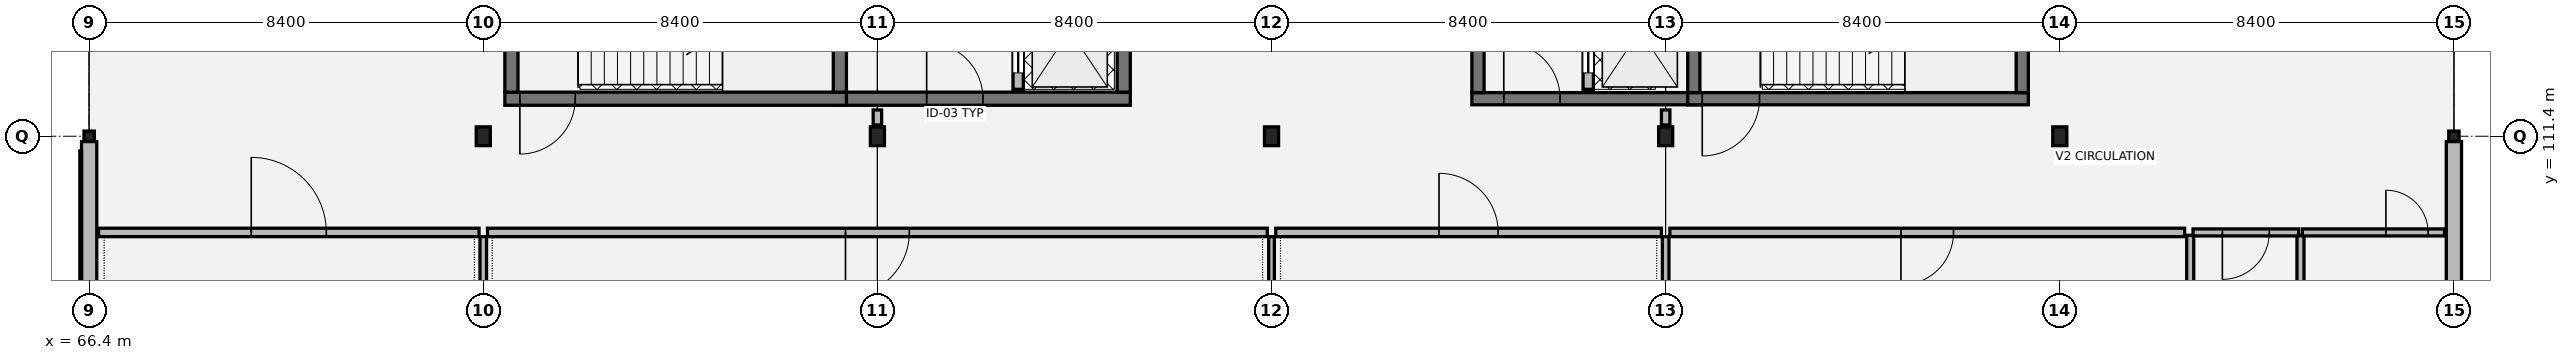
"""IFC4 building model, lengths in metres.
Left out: names, types, materials, properties, quantities, classifications, styles, units other than length and angle.
Written with IfcOpenShell. Run it as: python <this file> out.ifc"""

import sys

from ifc_helpers import new_model, si_unit, direction, frame, frame_2d, origin, origin_2d, place, context, subcontext, project, spatial, rectangle, hollow_rectangle, i_section, extrude, element, fill, save


model = new_model("IFC4")
c1 = context("Model", 3, precision=1e-05, world=origin(), true_north=direction((0.0, 1.0)))
c2 = subcontext(c1, "Body", "Model", "MODEL_VIEW")
j1 = project(units=[si_unit("LENGTHUNIT", "METRE"), si_unit("PLANEANGLEUNIT", "RADIAN")], contexts=[c1])
p1 = place(None, origin())
s1 = spatial("IfcSite", under=j1, at=p1, CompositionType="ELEMENT")
p2 = place(p1, origin())
s2 = spatial("IfcBuilding", under=s1, at=p2, CompositionType="ELEMENT")
p3 = place(p2, frame((0.0, 0.0, 13.26)))
s3 = spatial("IfcBuildingStorey", under=s2, at=p3, CompositionType="ELEMENT", Elevation=13.26)
p4 = place(p3, frame((66.4, 111.4, 0.0), z_axis=(0.0, 0.0, 1.0), x_axis=(1.0, 0.0, 0.0)))
e1 = element("IfcColumn", 1, at=p4, inside=s3, PredefinedType="COLUMN", context=c2, shape_type="SweptSolid", body=[
    extrude(hollow_rectangle(XDim=0.22, YDim=0.22, WallThickness=0.01, at=origin_2d()), origin(), (0.0, 0.0, 1.0), 4.055),
])
for number, where, z_axis, x_axis in (
    (2, (74.8, 111.4, 0.0), (0.0, 0.0, 1.0), (1.0, 0.0, 0.0)),
    (3, (83.2, 111.4, 0.0), (0.0, 0.0, 1.0), (1.0, 0.0, 0.0)),
    (4, (91.6, 111.4, 0.0), (0.0, 0.0, 1.0), (1.0, 0.0, 0.0)),
    (5, (100.0, 111.4, 0.0), (0.0, 0.0, 1.0), (1.0, 0.0, 0.0)),
    (6, (108.4, 111.4, 0.0), (0.0, 0.0, 1.0), (1.0, 0.0, 0.0)),
):
    element("IfcColumn", number, at=place(p3, frame(where, z_axis=z_axis, x_axis=x_axis)), inside=s3, PredefinedType="COLUMN", context=c2, shape_type="SweptSolid", body=[
        extrude(i_section(OverallWidth=0.3, OverallDepth=0.4, WebThickness=0.013, FlangeThickness=0.024, at=origin_2d()), origin(), (0.0, 0.0, 1.0), 4.055),
    ])
p5 = place(p3, frame((116.8, 111.4, 0.0), z_axis=(0.0, 0.0, 1.0), x_axis=(1.0, 0.0, 0.0)))
e7 = element("IfcColumn", 7, at=p5, inside=s3, PredefinedType="COLUMN", context=c2, shape_type="SweptSolid", body=[
    extrude(hollow_rectangle(XDim=0.22, YDim=0.22, WallThickness=0.01, at=origin_2d()), origin(), (0.0, 0.0, 1.0), 4.055),
])
for number, where, z_axis, x_axis in (
    (8, (116.8, 103.913, 0.0), (0.0, 0.0, 1.0), (0.0, 1.0, 0.0)),
    (9, (66.4, 111.287, 0.0), (0.0, 0.0, 1.0), (0.0, -1.0, 0.0)),
):
    element("IfcWall", number, at=place(p3, frame(where, z_axis=z_axis, x_axis=x_axis)), inside=s3, PredefinedType="SOLIDWALL", context=c2, shape_type="SweptSolid", body=[
        extrude(rectangle(XDim=7.374, YDim=0.325, at=frame_2d((3.687, 0.0))), origin(), (0.0, 0.0, 1.0), 3.48),
    ])
p6 = place(p3, frame((82.26, 112.2, 0.0), z_axis=(0.0, 0.0, 1.0), x_axis=(1.0, 0.0, 0.0)))
e10 = element("IfcWall", 10, at=p6, inside=s3, PredefinedType="SHEAR", context=c2, shape_type="SweptSolid", body=[
    extrude(rectangle(XDim=6.33, YDim=0.28, at=frame_2d((3.165, 0.0))), origin(), (0.0, 0.0, 1.0), 3.845),
])
p7 = place(p6, frame((1.99, 0.0, 0.0)))
e11 = element("IfcOpeningElement", 11, at=p7, cuts=e10, PredefinedType="OPENING", context=c2, shape_type="SweptSolid", body=[
    extrude(rectangle(XDim=1.2, YDim=2.16, at=frame_2d((0.6, 1.08))), frame((0.0, 0.15, 0.0), z_axis=(0.0, -1.0, 0.0), x_axis=(1.0, 0.0, 0.0)), (0.0, 0.0, 1.0), 0.3),
])
p8 = place(p3, frame((88.45, 112.34, 0.0), z_axis=(0.0, 0.0, 1.0), x_axis=(0.0, 1.0, 0.0)))
e12 = element("IfcWall", 12, at=p8, inside=s3, PredefinedType="SHEAR", context=c2, shape_type="SweptSolid", body=[
    extrude(rectangle(XDim=5.72, YDim=0.28, at=frame_2d((2.86, 0.0))), origin(), (0.0, 0.0, 1.0), 3.845),
])
p9 = place(p3, frame((86.2, 112.4, 0.0), z_axis=(0.0, 0.0, 1.0), x_axis=(0.0, 1.0, 0.0)))
e13 = element("IfcWall", 13, at=p9, inside=s3, PredefinedType="SOLIDWALL", context=c2, shape_type="SweptSolid", body=[
    extrude(rectangle(XDim=5.6, YDim=0.22, at=frame_2d((2.8, 0.0))), origin(), (0.0, 0.0, 1.0), 3.845),
])
p10 = place(p9, frame((0.35, 0.0, 0.0)))
e14 = element("IfcOpeningElement", 14, at=p10, cuts=e13, PredefinedType="OPENING", context=c2, shape_type="SweptSolid", body=[
    extrude(rectangle(XDim=1.1, YDim=2.15, at=frame_2d((0.55, 1.075))), frame((0.0, 0.12, 0.0), z_axis=(0.0, -1.0, 0.0), x_axis=(1.0, 0.0, 0.0)), (0.0, 0.0, 1.0), 0.24),
])
p11 = place(p9, frame((2.4, 0.0, 0.0)))
e15 = element("IfcOpeningElement", 15, at=p11, cuts=e13, PredefinedType="OPENING", context=c2, shape_type="SweptSolid", body=[
    extrude(rectangle(XDim=1.1, YDim=2.15, at=frame_2d((0.55, 1.075))), frame((0.0, 0.12, 0.0), z_axis=(0.0, -1.0, 0.0), x_axis=(1.0, 0.0, 0.0)), (0.0, 0.0, 1.0), 0.24),
])
p12 = place(p3, frame((75.26, 112.2, 0.0), z_axis=(0.0, 0.0, 1.0), x_axis=(1.0, 0.0, 0.0)))
e16 = element("IfcWall", 16, at=p12, inside=s3, PredefinedType="SHEAR", context=c2, shape_type="SweptSolid", body=[
    extrude(rectangle(XDim=7.28, YDim=0.28, at=frame_2d((3.64, 0.0))), origin(), (0.0, 0.0, 1.0), 3.845),
])
p13 = place(p12, frame((0.32, 0.0, 0.0)))
e17 = element("IfcOpeningElement", 17, at=p13, cuts=e16, PredefinedType="OPENING", context=c2, shape_type="SweptSolid", body=[
    extrude(rectangle(XDim=1.18, YDim=2.18, at=frame_2d((0.59, 1.09))), frame((0.0, 0.15, 0.0), z_axis=(0.0, -1.0, 0.0), x_axis=(1.0, 0.0, 0.0)), (0.0, 0.0, 1.0), 0.3),
])
for number, where, z_axis, x_axis in (
    (18, (75.4, 112.34, 0.0), (0.0, 0.0, 1.0), (0.0, 1.0, 0.0)),
    (19, (82.4, 112.34, 0.0), (0.0, 0.0, 1.0), (0.0, 1.0, 0.0)),
):
    element("IfcWall", number, at=place(p3, frame(where, z_axis=z_axis, x_axis=x_axis)), inside=s3, PredefinedType="SHEAR", context=c2, shape_type="SweptSolid", body=[
        extrude(rectangle(XDim=5.72, YDim=0.28, at=frame_2d((2.86, 0.0))), origin(), (0.0, 0.0, 1.0), 3.845),
    ])
p14 = place(p3, frame((95.87, 112.2, 0.0), z_axis=(0.0, 0.0, 1.0), x_axis=(1.0, 0.0, 0.0)))
e20 = element("IfcWall", 20, at=p14, inside=s3, PredefinedType="SHEAR", context=c2, shape_type="SweptSolid", body=[
    extrude(rectangle(XDim=4.86, YDim=0.26, at=frame_2d((2.43, 0.0))), origin(), (0.0, 0.0, 1.0), 3.845),
])
p15 = place(p14, frame((0.68, 0.0, 0.0)))
e21 = element("IfcOpeningElement", 21, at=p15, cuts=e20, PredefinedType="OPENING", context=c2, shape_type="SweptSolid", body=[
    extrude(rectangle(XDim=1.2, YDim=2.16, at=frame_2d((0.6, 1.08))), frame((0.0, 0.14, 0.0), z_axis=(0.0, -1.0, 0.0), x_axis=(1.0, 0.0, 0.0)), (0.0, 0.0, 1.0), 0.28),
])
p16 = place(p3, frame((96.0, 118.07, 0.0), z_axis=(0.0, 0.0, 1.0), x_axis=(0.0, -1.0, 0.0)))
e22 = element("IfcWall", 22, at=p16, inside=s3, PredefinedType="SHEAR", context=c2, shape_type="SweptSolid", body=[
    extrude(rectangle(XDim=5.74, YDim=0.26, at=frame_2d((2.87, 0.0))), origin(), (0.0, 0.0, 1.0), 3.845),
])
p17 = place(p3, frame((98.35, 112.4, 0.0), z_axis=(0.0, 0.0, 1.0), x_axis=(0.0, 1.0, 0.0)))
e23 = element("IfcWall", 23, at=p17, inside=s3, PredefinedType="SOLIDWALL", context=c2, shape_type="SweptSolid", body=[
    extrude(rectangle(XDim=5.6, YDim=0.22, at=frame_2d((2.8, 0.0))), origin(), (0.0, 0.0, 1.0), 3.845),
])
p18 = place(p17, frame((0.35, 0.0, 0.0)))
e24 = element("IfcOpeningElement", 24, at=p18, cuts=e23, PredefinedType="OPENING", context=c2, shape_type="SweptSolid", body=[
    extrude(rectangle(XDim=1.1, YDim=2.15, at=frame_2d((0.55, 1.075))), frame((0.0, 0.12, 0.0), z_axis=(0.0, -1.0, 0.0), x_axis=(1.0, 0.0, 0.0)), (0.0, 0.0, 1.0), 0.24),
])
p19 = place(p3, frame((100.47, 112.2, 0.0), z_axis=(0.0, 0.0, 1.0), x_axis=(1.0, 0.0, 0.0)))
e25 = element("IfcWall", 25, at=p19, inside=s3, PredefinedType="SHEAR", context=c2, shape_type="SweptSolid", body=[
    extrude(rectangle(XDim=7.26, YDim=0.26, at=frame_2d((3.63, 0.0))), origin(), (0.0, 0.0, 1.0), 3.845),
])
p20 = place(p19, frame((0.31, 0.0, 0.0)))
e26 = element("IfcOpeningElement", 26, at=p20, cuts=e25, PredefinedType="OPENING", context=c2, shape_type="SweptSolid", body=[
    extrude(rectangle(XDim=1.22, YDim=2.18, at=frame_2d((0.61, 1.09))), frame((0.0, 0.14, 0.0), z_axis=(0.0, -1.0, 0.0), x_axis=(1.0, 0.0, 0.0)), (0.0, 0.0, 1.0), 0.28),
])
for number, where, z_axis, x_axis in (
    (27, (100.6, 112.33, 0.0), (0.0, 0.0, 1.0), (0.0, 1.0, 0.0)),
    (28, (107.6, 112.33, 0.0), (0.0, 0.0, 1.0), (0.0, 1.0, 0.0)),
):
    element("IfcWall", number, at=place(p3, frame(where, z_axis=z_axis, x_axis=x_axis)), inside=s3, PredefinedType="SHEAR", context=c2, shape_type="SweptSolid", body=[
        extrude(rectangle(XDim=5.74, YDim=0.26, at=frame_2d((2.87, 0.0))), origin(), (0.0, 0.0, 1.0), 3.845),
    ])
for number, where, z_axis, x_axis in (
    (29, (111.18, 106.93, 0.0), (0.0, 0.0, 1.0), (0.0, 1.0, 0.0)),
    (30, (113.53, 106.93, 0.0), (0.0, 0.0, 1.0), (0.0, 1.0, 0.0)),
):
    element("IfcWall", number, at=place(p3, frame(where, z_axis=z_axis, x_axis=x_axis)), inside=s3, PredefinedType="PARTITIONING", context=c2, shape_type="SweptSolid", body=[
        extrude(rectangle(XDim=2.36, YDim=0.15, at=frame_2d((1.18, 0.0))), origin(), (0.0, 0.0, 1.0), 3.18),
    ])
p21 = place(p3, frame((111.24, 109.35, 0.0), z_axis=(0.0, 0.0, 1.0), x_axis=(1.0, 0.0, 0.0)))
e31 = element("IfcWall", 31, at=p21, inside=s3, PredefinedType="PARTITIONING", context=c2, shape_type="SweptSolid", body=[
    extrude(rectangle(XDim=2.25, YDim=0.15, at=frame_2d((1.125, 0.0))), origin(), (0.0, 0.0, 1.0), 3.18),
])
p22 = place(p21, frame((0.625, 0.0, 0.0)))
e32 = element("IfcOpeningElement", 32, at=p22, cuts=e31, PredefinedType="OPENING", context=c2, shape_type="SweptSolid", body=[
    extrude(rectangle(XDim=1.0, YDim=2.15, at=frame_2d((0.5, 1.075))), frame((0.0, 0.085, 0.0), z_axis=(0.0, -1.0, 0.0), x_axis=(1.0, 0.0, 0.0)), (0.0, 0.0, 1.0), 0.17),
])
p23 = place(p3, frame((113.57, 109.35, 0.0), z_axis=(0.0, 0.0, 1.0), x_axis=(1.0, 0.0, 0.0)))
e33 = element("IfcWall", 33, at=p23, inside=s3, PredefinedType="PARTITIONING", context=c2, shape_type="SweptSolid", body=[
    extrude(rectangle(XDim=3.03, YDim=0.15, at=frame_2d((1.515, 0.0))), origin(), (0.0, 0.0, 1.0), 3.18),
])
p24 = place(p23, frame((1.78, 0.0, 0.0)))
e34 = element("IfcOpeningElement", 34, at=p24, cuts=e33, PredefinedType="OPENING", context=c2, shape_type="SweptSolid", body=[
    extrude(rectangle(XDim=0.9, YDim=2.15, at=frame_2d((0.45, 1.075))), frame((0.0, 0.085, 0.0), z_axis=(0.0, -1.0, 0.0), x_axis=(1.0, 0.0, 0.0)), (0.0, 0.0, 1.0), 0.17),
])
p25 = place(p3, frame((66.6, 109.35, 0.0), z_axis=(0.0, 0.0, 1.0), x_axis=(1.0, 0.0, 0.0)))
e35 = element("IfcWall", 35, at=p25, inside=s3, PredefinedType="PARTITIONING", context=c2, shape_type="SweptSolid", body=[
    extrude(rectangle(XDim=8.11, YDim=0.18, at=frame_2d((4.055, 0.0))), origin(), (0.0, 0.0, 1.0), 3.18),
])
p26 = place(p25, frame((3.255, 0.0, 0.0)))
e36 = element("IfcOpeningElement", 36, at=p26, cuts=e35, PredefinedType="OPENING", context=c2, shape_type="SweptSolid", body=[
    extrude(rectangle(XDim=1.6, YDim=2.25, at=frame_2d((0.8, 1.125))), frame((0.0, 0.1, 0.0), z_axis=(0.0, -1.0, 0.0), x_axis=(1.0, 0.0, 0.0)), (0.0, 0.0, 1.0), 0.2),
])
p27 = place(p3, frame((74.89, 109.35, 0.0), z_axis=(0.0, 0.0, 1.0), x_axis=(1.0, 0.0, 0.0)))
e37 = element("IfcWall", 37, at=p27, inside=s3, PredefinedType="PARTITIONING", context=c2, shape_type="SweptSolid", body=[
    extrude(rectangle(XDim=16.62, YDim=0.18, at=frame_2d((8.31, 0.0))), origin(), (0.0, 0.0, 1.0), 3.18),
])
p28 = place(p27, frame((7.63, 0.0, 0.0)))
e38 = element("IfcOpeningElement", 38, at=p28, cuts=e37, PredefinedType="OPENING", context=c2, shape_type="SweptSolid", body=[
    extrude(rectangle(XDim=1.36, YDim=2.2, at=frame_2d((0.68, 1.1))), frame((0.0, 0.1, 0.0), z_axis=(0.0, -1.0, 0.0), x_axis=(1.0, 0.0, 0.0)), (0.0, 0.0, 1.0), 0.2),
])
p29 = place(p3, frame((91.69, 109.35, 0.0), z_axis=(0.0, 0.0, 1.0), x_axis=(1.0, 0.0, 0.0)))
e39 = element("IfcWall", 39, at=p29, inside=s3, PredefinedType="PARTITIONING", context=c2, shape_type="SweptSolid", body=[
    extrude(rectangle(XDim=8.22, YDim=0.18, at=frame_2d((4.11, 0.0))), origin(), (0.0, 0.0, 1.0), 3.18),
])
p30 = place(p29, frame((3.48, 0.0, 0.0)))
e40 = element("IfcOpeningElement", 40, at=p30, cuts=e39, PredefinedType="OPENING", context=c2, shape_type="SweptSolid", body=[
    extrude(rectangle(XDim=1.26, YDim=2.2, at=frame_2d((0.63, 1.1))), frame((0.0, 0.1, 0.0), z_axis=(0.0, -1.0, 0.0), x_axis=(1.0, 0.0, 0.0)), (0.0, 0.0, 1.0), 0.2),
])
p31 = place(p3, frame((100.09, 109.35, 0.0), z_axis=(0.0, 0.0, 1.0), x_axis=(1.0, 0.0, 0.0)))
e41 = element("IfcWall", 41, at=p31, inside=s3, PredefinedType="PARTITIONING", context=c2, shape_type="SweptSolid", body=[
    extrude(rectangle(XDim=10.97, YDim=0.18, at=frame_2d((5.485, 0.0))), origin(), (0.0, 0.0, 1.0), 3.18),
])
p32 = place(p31, frame((4.925, 0.0, 0.0)))
e42 = element("IfcOpeningElement", 42, at=p32, cuts=e41, PredefinedType="OPENING", context=c2, shape_type="SweptSolid", body=[
    extrude(rectangle(XDim=1.12, YDim=2.15, at=frame_2d((0.56, 1.075))), frame((0.0, 0.1, 0.0), z_axis=(0.0, -1.0, 0.0), x_axis=(1.0, 0.0, 0.0)), (0.0, 0.0, 1.0), 0.2),
])
for number, where, z_axis, x_axis in (
    (43, (83.2, 111.64, 0.0), (0.0, 0.0, 1.0), (0.0, 1.0, 0.0)),
    (44, (100.0, 111.64, 0.0), (0.0, 0.0, 1.0), (0.0, 1.0, 0.0)),
):
    element("IfcWall", number, at=place(p3, frame(where, z_axis=z_axis, x_axis=x_axis)), inside=s3, PredefinedType="PARTITIONING", context=c2, shape_type="SweptSolid", body=[
        extrude(rectangle(XDim=0.32, YDim=0.18, at=frame_2d((0.16, 0.0))), origin(), (0.0, 0.0, 1.0), 3.18),
    ])
p33 = place(p3, frame((74.8, 88.92, 0.0), z_axis=(0.0, 0.0, 1.0), x_axis=(0.0, 1.0, 0.0)))
e45 = element("IfcWall", 45, at=p33, inside=s3, PredefinedType="PARTITIONING", context=c2, shape_type="SweptSolid", body=[
    extrude(rectangle(XDim=20.34, YDim=0.14, at=frame_2d((10.17, 0.0))), origin(), (0.0, 0.0, 1.0), 3.18),
])
p34 = place(p3, frame((91.6, 88.92, 0.0), z_axis=(0.0, 0.0, 1.0), x_axis=(0.0, 1.0, 0.0)))
e46 = element("IfcWall", 46, at=p34, inside=s3, PredefinedType="PARTITIONING", context=c2, shape_type="SweptSolid", body=[
    extrude(rectangle(XDim=20.34, YDim=0.12, at=frame_2d((10.17, 0.0))), origin(), (0.0, 0.0, 1.0), 3.18),
])
p35 = place(p3, frame((100.0, 88.92, 0.0), z_axis=(0.0, 0.0, 1.0), x_axis=(0.0, 1.0, 0.0)))
e47 = element("IfcWall", 47, at=p35, inside=s3, PredefinedType="PARTITIONING", context=c2, shape_type="SweptSolid", body=[
    extrude(rectangle(XDim=20.34, YDim=0.14, at=frame_2d((10.17, 0.0))), origin(), (0.0, 0.0, 1.0), 3.18),
])
p36 = place(p7, origin())
e48 = element("IfcDoor", 48, at=p36, inside=s3, OperationType="SINGLE_SWING_LEFT", PredefinedType="DOOR", context=c2, shape_type="SweptSolid", body=[
    extrude(rectangle(XDim=1.2, YDim=2.16, at=frame_2d((0.6, 1.08))), frame((0.0, 0.025, 0.0), z_axis=(0.0, -1.0, 0.0), x_axis=(1.0, 0.0, 0.0)), (0.0, 0.0, 1.0), 0.05),
])
fill(e11, e48)
p37 = place(p10, origin())
e49 = element("IfcDoor", 49, at=p37, inside=s3, OperationType="SLIDING_TO_LEFT", PredefinedType="DOOR", context=c2, shape_type="SweptSolid", body=[
    extrude(rectangle(XDim=1.1, YDim=2.15, at=frame_2d((0.55, 1.075))), frame((0.0, 0.025, 0.0), z_axis=(0.0, -1.0, 0.0), x_axis=(1.0, 0.0, 0.0)), (0.0, 0.0, 1.0), 0.05),
])
fill(e14, e49)
p38 = place(p13, origin())
e50 = element("IfcDoor", 50, at=p38, inside=s3, OperationType="SINGLE_SWING_RIGHT", PredefinedType="DOOR", context=c2, shape_type="SweptSolid", body=[
    extrude(rectangle(XDim=1.18, YDim=2.18, at=frame_2d((0.59, 1.09))), frame((0.0, 0.025, 0.0), z_axis=(0.0, -1.0, 0.0), x_axis=(1.0, 0.0, 0.0)), (0.0, 0.0, 1.0), 0.05),
])
fill(e17, e50)
p39 = place(p15, origin())
e51 = element("IfcDoor", 51, at=p39, inside=s3, OperationType="SINGLE_SWING_LEFT", PredefinedType="DOOR", context=c2, shape_type="SweptSolid", body=[
    extrude(rectangle(XDim=1.2, YDim=2.16, at=frame_2d((0.6, 1.08))), frame((0.0, 0.025, 0.0), z_axis=(0.0, -1.0, 0.0), x_axis=(1.0, 0.0, 0.0)), (0.0, 0.0, 1.0), 0.05),
])
fill(e21, e51)
p40 = place(p18, origin())
e52 = element("IfcDoor", 52, at=p40, inside=s3, OperationType="SLIDING_TO_LEFT", PredefinedType="DOOR", context=c2, shape_type="SweptSolid", body=[
    extrude(rectangle(XDim=1.1, YDim=2.15, at=frame_2d((0.55, 1.075))), frame((0.0, 0.025, 0.0), z_axis=(0.0, -1.0, 0.0), x_axis=(1.0, 0.0, 0.0)), (0.0, 0.0, 1.0), 0.05),
])
fill(e24, e52)
p41 = place(p20, origin())
e53 = element("IfcDoor", 53, at=p41, inside=s3, OperationType="SINGLE_SWING_RIGHT", PredefinedType="DOOR", context=c2, shape_type="SweptSolid", body=[
    extrude(rectangle(XDim=1.22, YDim=2.18, at=frame_2d((0.61, 1.09))), frame((0.0, 0.025, 0.0), z_axis=(0.0, -1.0, 0.0), x_axis=(1.0, 0.0, 0.0)), (0.0, 0.0, 1.0), 0.05),
])
fill(e26, e53)
p42 = place(p22, origin())
e54 = element("IfcDoor", 54, at=p42, inside=s3, OperationType="SINGLE_SWING_RIGHT", PredefinedType="DOOR", context=c2, shape_type="SweptSolid", body=[
    extrude(rectangle(XDim=1.0, YDim=2.15, at=frame_2d((0.5, 1.075))), frame((0.0, 0.025, 0.0), z_axis=(0.0, -1.0, 0.0), x_axis=(1.0, 0.0, 0.0)), (0.0, 0.0, 1.0), 0.05),
])
fill(e32, e54)
p43 = place(p24, origin())
e55 = element("IfcDoor", 55, at=p43, inside=s3, OperationType="SINGLE_SWING_LEFT", PredefinedType="DOOR", context=c2, shape_type="SweptSolid", body=[
    extrude(rectangle(XDim=0.9, YDim=2.15, at=frame_2d((0.45, 1.075))), frame((0.0, 0.025, 0.0), z_axis=(0.0, -1.0, 0.0), x_axis=(1.0, 0.0, 0.0)), (0.0, 0.0, 1.0), 0.05),
])
fill(e34, e55)
p44 = place(p26, origin())
e56 = element("IfcDoor", 56, at=p44, inside=s3, OperationType="DOUBLE_DOOR_SINGLE_SWING", PredefinedType="DOOR", context=c2, shape_type="SweptSolid", body=[
    extrude(rectangle(XDim=1.6, YDim=2.25, at=frame_2d((0.8, 1.125))), frame((0.0, 0.025, 0.0), z_axis=(0.0, -1.0, 0.0), x_axis=(1.0, 0.0, 0.0)), (0.0, 0.0, 1.0), 0.05),
])
fill(e36, e56)
p45 = place(p28, origin())
e57 = element("IfcDoor", 57, at=p45, inside=s3, OperationType="SINGLE_SWING_RIGHT", PredefinedType="DOOR", context=c2, shape_type="SweptSolid", body=[
    extrude(rectangle(XDim=1.36, YDim=2.2, at=frame_2d((0.68, 1.1))), frame((0.0, 0.025, 0.0), z_axis=(0.0, -1.0, 0.0), x_axis=(1.0, 0.0, 0.0)), (0.0, 0.0, 1.0), 0.05),
])
fill(e38, e57)
p46 = place(p30, origin())
e58 = element("IfcDoor", 58, at=p46, inside=s3, OperationType="SINGLE_SWING_LEFT", PredefinedType="DOOR", context=c2, shape_type="SweptSolid", body=[
    extrude(rectangle(XDim=1.26, YDim=2.2, at=frame_2d((0.63, 1.1))), frame((0.0, 0.025, 0.0), z_axis=(0.0, -1.0, 0.0), x_axis=(1.0, 0.0, 0.0)), (0.0, 0.0, 1.0), 0.05),
])
fill(e40, e58)
p47 = place(p32, origin())
e59 = element("IfcDoor", 59, at=p47, inside=s3, OperationType="SINGLE_SWING_RIGHT", PredefinedType="DOOR", context=c2, shape_type="SweptSolid", body=[
    extrude(rectangle(XDim=1.12, YDim=2.15, at=frame_2d((0.56, 1.075))), frame((0.0, 0.025, 0.0), z_axis=(0.0, -1.0, 0.0), x_axis=(1.0, 0.0, 0.0)), (0.0, 0.0, 1.0), 0.05),
])
fill(e42, e59)
save(model, sys.argv[1])
